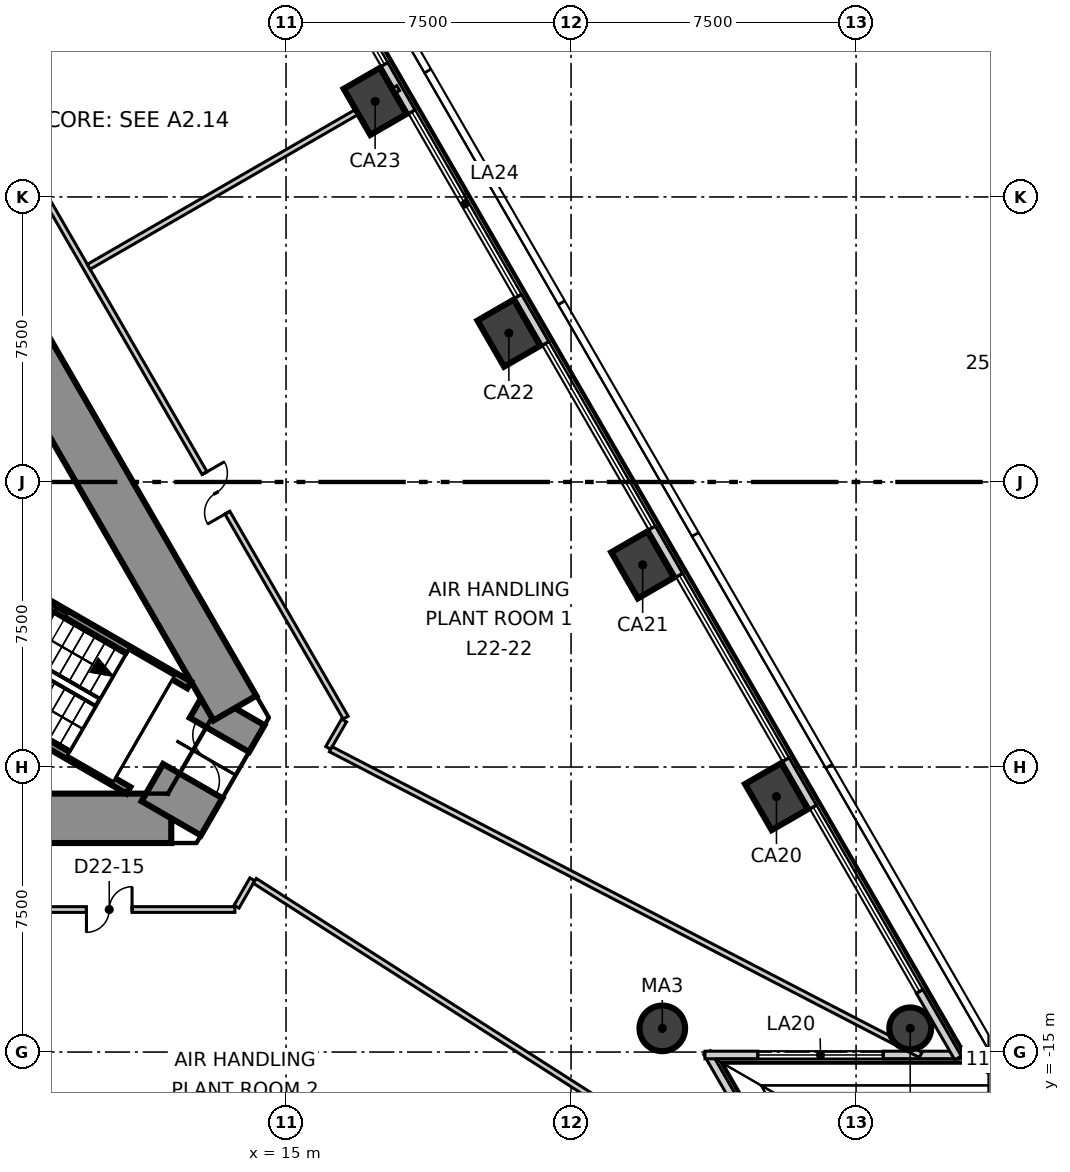
"""IFC4 building model, lengths in metres.
Left out: names, types, materials, properties, quantities, classifications, styles, units other than length and angle.
Written with IfcOpenShell. Run it as: python <this file> out.ifc"""

import sys

from ifc_helpers import new_model, si_unit, direction, frame, frame_2d, origin, origin_2d, place, context, subcontext, project, spatial, polyline, rectangle, circle, outline, extrude, element, fill, save


model = new_model("IFC4")
c1 = context("Model", 3, precision=1e-05, world=origin(), true_north=direction((0.0, 1.0)))
c2 = subcontext(c1, "Body", "Model", "MODEL_VIEW")
j1 = project(units=[si_unit("LENGTHUNIT", "METRE"), si_unit("PLANEANGLEUNIT", "RADIAN")], contexts=[c1])
p1 = place(None, origin())
s1 = spatial("IfcSite", under=j1, at=p1, CompositionType="ELEMENT")
p2 = place(p1, origin())
s2 = spatial("IfcBuilding", under=s1, at=p2, CompositionType="ELEMENT")
p3 = place(p2, frame((0.0, 0.0, 99.8)))
s3 = spatial("IfcBuildingStorey", under=s2, at=p3, CompositionType="ELEMENT", Elevation=99.8)
p4 = place(p3, frame((-11.98, -8.85, -0.6), z_axis=(0.0, 0.0, 1.0), x_axis=(1.0, 0.0, 0.0)))
e1 = element("IfcWall", 1, at=p4, inside=s3, PredefinedType="SHEAR", context=c2, shape_type="SweptSolid", body=[
    extrude(outline(polyline([(-0.664, -0.65), (1.281, -0.65), (3.226, -0.65), (5.172, -0.65), (7.117, -0.65), (9.062, -0.65), (11.007, -0.65), (12.953, -0.65), (14.898, -0.65), (16.843, -0.65), (18.788, -0.65), (20.734, -0.65), (22.679, -0.65), (24.624, -0.65), (23.296, 0.65), (21.41, 0.65), (19.524, 0.65), (17.638, 0.65), (15.752, 0.65), (13.866, 0.65), (11.98, 0.65), (10.094, 0.65), (8.208, 0.65), (6.322, 0.65), (4.436, 0.65), (2.55, 0.65), (0.664, 0.65), (-0.664, -0.65)])), origin(), (0.0, 0.0, 1.0), 4.8),
])
p5 = place(p3, frame((11.98, -8.85, -0.6), z_axis=(0.0, 0.0, 1.0), x_axis=(0.499926515799, 0.866067825751, 0.0)))
e2 = element("IfcWall", 2, at=p5, inside=s3, PredefinedType="SHEAR", context=c2, shape_type="SweptSolid", body=[
    extrude(outline(polyline([(-0.231, -0.9), (1.674, -0.9), (3.579, -0.9), (3.118, 0.9), (1.674, 0.9), (0.231, 0.9), (-0.231, -0.9)])), origin(), (0.0, 0.0, 1.0), 4.8),
])
p6 = place(p5, frame((1.133, 0.0, 0.6)))
e3 = element("IfcOpeningElement", 3, at=p6, cuts=e2, PredefinedType="OPENING", context=c2, shape_type="SweptSolid", body=[
    extrude(rectangle(XDim=1.4, YDim=2.1, at=frame_2d((0.7, 1.05))), frame((0.0, 0.91, 0.0), z_axis=(0.0, -1.0, 0.0), x_axis=(1.0, 0.0, 0.0)), (0.0, 0.0, 1.0), 1.82),
])
p7 = place(p3, frame((13.654, -5.95, -0.6), z_axis=(0.0, 0.0, 1.0), x_axis=(-0.499998822509, 0.866026083608, 0.0)))
e4 = element("IfcWall", 4, at=p7, inside=s3, PredefinedType="SHEAR", context=c2, shape_type="SweptSolid", body=[
    extrude(outline(polyline([(-0.664, -0.65), (1.281, -0.65), (3.226, -0.65), (5.172, -0.65), (7.117, -0.65), (9.062, -0.65), (11.007, -0.65), (12.953, -0.65), (14.898, -0.65), (16.843, -0.65), (18.788, -0.65), (20.734, -0.65), (22.679, -0.65), (24.624, -0.65), (23.296, 0.65), (21.41, 0.65), (19.524, 0.65), (17.638, 0.65), (15.752, 0.65), (13.866, 0.65), (11.98, 0.65), (10.094, 0.65), (8.208, 0.65), (6.322, 0.65), (4.436, 0.65), (2.55, 0.65), (0.664, 0.65), (-0.664, -0.65)])), origin(), (0.0, 0.0, 1.0), 4.8),
])
p8 = place(p7, frame((11.369, 0.0, 0.6)))
e5 = element("IfcOpeningElement", 5, at=p8, cuts=e4, PredefinedType="OPENING", context=c2, shape_type="SweptSolid", body=[
    extrude(rectangle(XDim=1.8, YDim=2.1, at=frame_2d((0.9, 1.05))), frame((0.0, 0.66, 0.0), z_axis=(0.0, -1.0, 0.0), x_axis=(1.0, 0.0, 0.0)), (0.0, 0.0, 1.0), 1.32),
])
p9 = place(p3, frame((31.425, -14.377, -0.6), z_axis=(0.0, 0.0, 1.0), x_axis=(-0.5, 0.866025403784, 0.0)))
e6 = element("IfcColumn", 6, at=p9, inside=s3, PredefinedType="COLUMN", context=c2, shape_type="SweptSolid", body=[
    extrude(circle(Radius=0.55, at=origin_2d()), origin(), (0.0, 0.0, 1.0), 4.8),
])
for number, where, z_axis, x_axis in (
    (7, (27.905, -8.279, -0.6), (0.0, 0.0, 1.0), (-0.5, 0.866, 0.0)),
    (8, (24.384, -2.182, -0.6), (0.0, 0.0, 1.0), (-0.5, 0.866, 0.0)),
    (9, (20.864, 3.916, -0.6), (0.0, 0.0, 1.0), (-0.5, 0.866, 0.0)),
    (10, (17.344, 10.014, -0.6), (0.0, 0.0, 1.0), (-0.5, 0.866, 0.0)),
):
    element("IfcColumn", number, at=place(p3, frame(where, z_axis=z_axis, x_axis=x_axis)), inside=s3, PredefinedType="COLUMN", context=c2, shape_type="SweptSolid", body=[
        extrude(rectangle(XDim=1.4, YDim=1.1, at=origin_2d()), origin(), (0.0, 0.0, 1.0), 4.8),
    ])
p10 = place(p3, frame((24.901, -14.377, -0.6), z_axis=(0.0, 0.0, 1.0), x_axis=(1.0, 0.0, 0.0)))
e11 = element("IfcColumn", 11, at=p10, inside=s3, PredefinedType="COLUMN", context=c2, shape_type="SweptSolid", body=[
    extrude(circle(Radius=0.6, at=origin_2d()), origin(), (0.0, 0.0, 1.0), 4.8),
])
p11 = place(p3, frame((29.421, -20.805, 0.0), z_axis=(0.0, 0.0, 1.0), x_axis=(-0.499957477642, 0.866049952687, 0.0)))
e12 = element("IfcWall", 12, at=p11, inside=s3, PredefinedType="ELEMENTEDWALL", context=c2, shape_type="SweptSolid", body=[
    extrude(rectangle(XDim=6.684, YDim=0.2, at=frame_2d((3.342, 0.0))), origin(), (0.0, 0.0, 1.0), 4.2),
])
p12 = place(p11, frame((1.99, 0.0, 0.6)))
e13 = element("IfcOpeningElement", 13, at=p12, cuts=e12, PredefinedType="OPENING", context=c2, shape_type="SweptSolid", body=[
    extrude(rectangle(XDim=3.3, YDim=3.0, at=frame_2d((1.65, 1.5))), frame((0.0, 0.11, 0.0), z_axis=(0.0, -1.0, 0.0), x_axis=(1.0, 0.0, 0.0)), (0.0, 0.0, 1.0), 0.22),
])
p13 = place(p3, frame((26.024, -15.077, 0.0), z_axis=(0.0, 0.0, 1.0), x_axis=(1.0, 0.0, 0.0)))
e14 = element("IfcWall", 14, at=p13, inside=s3, PredefinedType="ELEMENTEDWALL", context=c2, shape_type="SweptSolid", body=[
    extrude(rectangle(XDim=6.684, YDim=0.2, at=frame_2d((3.342, 0.0))), origin(), (0.0, 0.0, 1.0), 4.2),
])
p14 = place(p13, frame((1.39, 0.0, 0.6)))
e15 = element("IfcOpeningElement", 15, at=p14, cuts=e14, PredefinedType="OPENING", context=c2, shape_type="SweptSolid", body=[
    extrude(rectangle(XDim=3.3, YDim=3.0, at=frame_2d((1.65, 1.5))), frame((0.0, 0.11, 0.0), z_axis=(0.0, -1.0, 0.0), x_axis=(1.0, 0.0, 0.0)), (0.0, 0.0, 1.0), 0.22),
])
p15 = place(p3, frame((32.683, -15.155, 0.0), z_axis=(0.0, 0.0, 1.0), x_axis=(-0.499995323711, 0.866028103624, 0.0)))
e16 = element("IfcWall", 16, at=p15, inside=s3, PredefinedType="ELEMENTEDWALL", context=c2, shape_type="SweptSolid", body=[
    extrude(rectangle(XDim=58.913, YDim=0.2, at=frame_2d((29.456, 0.0))), origin(), (0.0, 0.0, 1.0), 4.2),
])
p16 = place(p15, frame((2.023, 0.0, 0.6)))
e17 = element("IfcOpeningElement", 17, at=p16, cuts=e16, PredefinedType="OPENING", context=c2, shape_type="SweptSolid", body=[
    extrude(rectangle(XDim=5.6, YDim=3.0, at=frame_2d((2.8, 1.5))), frame((0.0, 0.11, 0.0), z_axis=(0.0, -1.0, 0.0), x_axis=(1.0, 0.0, 0.0)), (0.0, 0.0, 1.0), 0.22),
])
p17 = place(p15, frame((9.064, 0.0, 0.6)))
e18 = element("IfcOpeningElement", 18, at=p17, cuts=e16, PredefinedType="OPENING", context=c2, shape_type="SweptSolid", body=[
    extrude(rectangle(XDim=5.6, YDim=3.0, at=frame_2d((2.8, 1.5))), frame((0.0, 0.11, 0.0), z_axis=(0.0, -1.0, 0.0), x_axis=(1.0, 0.0, 0.0)), (0.0, 0.0, 1.0), 0.22),
])
p18 = place(p15, frame((16.105, 0.0, 0.6)))
e19 = element("IfcOpeningElement", 19, at=p18, cuts=e16, PredefinedType="OPENING", context=c2, shape_type="SweptSolid", body=[
    extrude(rectangle(XDim=5.6, YDim=3.0, at=frame_2d((2.8, 1.5))), frame((0.0, 0.11, 0.0), z_axis=(0.0, -1.0, 0.0), x_axis=(1.0, 0.0, 0.0)), (0.0, 0.0, 1.0), 0.22),
])
p19 = place(p15, frame((23.146, 0.0, 0.6)))
e20 = element("IfcOpeningElement", 20, at=p19, cuts=e16, PredefinedType="OPENING", context=c2, shape_type="SweptSolid", body=[
    extrude(rectangle(XDim=5.6, YDim=3.0, at=frame_2d((2.8, 1.5))), frame((0.0, 0.11, 0.0), z_axis=(0.0, -1.0, 0.0), x_axis=(1.0, 0.0, 0.0)), (0.0, 0.0, 1.0), 0.22),
])
p20 = place(p15, frame((30.187, 0.0, 0.6)))
e21 = element("IfcOpeningElement", 21, at=p20, cuts=e16, PredefinedType="OPENING", context=c2, shape_type="SweptSolid", body=[
    extrude(rectangle(XDim=5.6, YDim=3.0, at=frame_2d((2.8, 1.5))), frame((0.0, 0.11, 0.0), z_axis=(0.0, -1.0, 0.0), x_axis=(1.0, 0.0, 0.0)), (0.0, 0.0, 1.0), 0.22),
])
p21 = place(p15, frame((37.228, 0.0, 0.6)))
e22 = element("IfcOpeningElement", 22, at=p21, cuts=e16, PredefinedType="OPENING", context=c2, shape_type="SweptSolid", body=[
    extrude(rectangle(XDim=5.6, YDim=3.0, at=frame_2d((2.8, 1.5))), frame((0.0, 0.11, 0.0), z_axis=(0.0, -1.0, 0.0), x_axis=(1.0, 0.0, 0.0)), (0.0, 0.0, 1.0), 0.22),
])
p22 = place(p15, frame((44.268, 0.0, 0.6)))
e23 = element("IfcOpeningElement", 23, at=p22, cuts=e16, PredefinedType="OPENING", context=c2, shape_type="SweptSolid", body=[
    extrude(rectangle(XDim=5.6, YDim=3.0, at=frame_2d((2.8, 1.5))), frame((0.0, 0.11, 0.0), z_axis=(0.0, -1.0, 0.0), x_axis=(1.0, 0.0, 0.0)), (0.0, 0.0, 1.0), 0.22),
])
p23 = place(p15, frame((51.309, 0.0, 0.6)))
e24 = element("IfcOpeningElement", 24, at=p23, cuts=e16, PredefinedType="OPENING", context=c2, shape_type="SweptSolid", body=[
    extrude(rectangle(XDim=5.6, YDim=3.0, at=frame_2d((2.8, 1.5))), frame((0.0, 0.11, 0.0), z_axis=(0.0, -1.0, 0.0), x_axis=(1.0, 0.0, 0.0)), (0.0, 0.0, 1.0), 0.22),
])
p24 = place(p3, frame((-13.568, -11.25, 0.0), z_axis=(0.0, 0.0, 1.0), x_axis=(1.0, 0.0, 0.0)))
e25 = element("IfcWall", 25, at=p24, inside=s3, PredefinedType="PARTITIONING", context=c2, shape_type="SweptSolid", body=[
    extrude(rectangle(XDim=27.222, YDim=0.15, at=frame_2d((13.611, 0.0))), origin(), (0.0, 0.0, 1.0), 4.2),
])
p25 = place(p24, frame((2.62, 0.0, 0.0)))
e26 = element("IfcOpeningElement", 26, at=p25, cuts=e25, PredefinedType="OPENING", context=c2, shape_type="SweptSolid", body=[
    extrude(rectangle(XDim=1.2, YDim=2.1, at=frame_2d((0.6, 1.05))), frame((0.0, 0.085, 0.0), z_axis=(0.0, -1.0, 0.0), x_axis=(1.0, 0.0, 0.0)), (0.0, 0.0, 1.0), 0.17),
])
p26 = place(p24, frame((12.968, 0.0, 0.0)))
e27 = element("IfcOpeningElement", 27, at=p26, cuts=e25, PredefinedType="OPENING", context=c2, shape_type="SweptSolid", body=[
    extrude(rectangle(XDim=1.2, YDim=2.1, at=frame_2d((0.6, 1.05))), frame((0.0, 0.085, 0.0), z_axis=(0.0, -1.0, 0.0), x_axis=(1.0, 0.0, 0.0)), (0.0, 0.0, 1.0), 0.17),
])
p27 = place(p24, frame((23.316, 0.0, 0.0)))
e28 = element("IfcOpeningElement", 28, at=p27, cuts=e25, PredefinedType="OPENING", context=c2, shape_type="SweptSolid", body=[
    extrude(rectangle(XDim=1.2, YDim=2.1, at=frame_2d((0.6, 1.05))), frame((0.0, 0.085, 0.0), z_axis=(0.0, -1.0, 0.0), x_axis=(1.0, 0.0, 0.0)), (0.0, 0.0, 1.0), 0.17),
])
p28 = place(p3, frame((2.959, 17.375, 0.0), z_axis=(0.0, 0.0, 1.0), x_axis=(0.500002192499, -0.866024137941, 0.0)))
e29 = element("IfcWall", 29, at=p28, inside=s3, PredefinedType="PARTITIONING", context=c2, shape_type="SweptSolid", body=[
    extrude(rectangle(XDim=27.222, YDim=0.15, at=frame_2d((13.611, 0.0))), origin(), (0.0, 0.0, 1.0), 4.2),
])
p29 = place(p28, frame((19.795, 0.0, 0.0)))
e30 = element("IfcOpeningElement", 30, at=p29, cuts=e29, PredefinedType="OPENING", context=c2, shape_type="SweptSolid", body=[
    extrude(rectangle(XDim=1.2, YDim=2.1, at=frame_2d((0.6, 1.05))), frame((0.0, 0.085, 0.0), z_axis=(0.0, -1.0, 0.0), x_axis=(1.0, 0.0, 0.0)), (0.0, 0.0, 1.0), 0.17),
])
p30 = place(p28, frame((6.141, 0.0, 0.0)))
e31 = element("IfcOpeningElement", 31, at=p30, cuts=e29, PredefinedType="OPENING", context=c2, shape_type="SweptSolid", body=[
    extrude(rectangle(XDim=1.2, YDim=2.1, at=frame_2d((0.6, 1.05))), frame((0.0, 0.085, 0.0), z_axis=(0.0, -1.0, 0.0), x_axis=(1.0, 0.0, 0.0)), (0.0, 0.0, 1.0), 0.17),
])
p31 = place(p3, frame((13.698, -11.175, 0.0), z_axis=(0.0, 0.0, 1.0), x_axis=(0.499425709803, 0.866356716594, 0.0)))
e32 = element("IfcWall", 32, at=p31, inside=s3, PredefinedType="PARTITIONING", context=c2, shape_type="SweptSolid", body=[
    extrude(rectangle(XDim=0.831, YDim=0.15, at=frame_2d((0.416, 0.0))), origin(), (0.0, 0.0, 1.0), 4.2),
])
p32 = place(p3, frame((16.109, -6.998, 0.0), z_axis=(0.0, 0.0, 1.0), x_axis=(0.500633001124, 0.865659631833, 0.0)))
e33 = element("IfcWall", 33, at=p32, inside=s3, PredefinedType="PARTITIONING", context=c2, shape_type="SweptSolid", body=[
    extrude(rectangle(XDim=0.835, YDim=0.15, at=frame_2d((0.418, 0.0))), origin(), (0.0, 0.0, 1.0), 4.2),
])
p33 = place(p3, frame((14.177, -10.495, 0.0), z_axis=(0.0, 0.0, 1.0), x_axis=(0.842276215782, -0.539046172724, 0.0)))
e34 = element("IfcWall", 34, at=p33, inside=s3, PredefinedType="PARTITIONING", context=c2, shape_type="SweptSolid", body=[
    extrude(rectangle(XDim=17.496, YDim=0.15, at=frame_2d((8.748, 0.0))), origin(), (0.0, 0.0, 1.0), 3.4),
])
p34 = place(p3, frame((9.808, 5.662, 0.0), z_axis=(0.0, 0.0, 1.0), x_axis=(0.866014767649, 0.500018421874, 0.0)))
e35 = element("IfcWall", 35, at=p34, inside=s3, PredefinedType="PARTITIONING", context=c2, shape_type="SweptSolid", body=[
    extrude(rectangle(XDim=9.402, YDim=0.15, at=frame_2d((4.701, 0.0))), origin(), (0.0, 0.0, 1.0), 3.7),
])
p35 = place(p3, frame((16.176, -7.032, 0.0), z_axis=(0.0, 0.0, 1.0), x_axis=(0.887871998407, -0.460090550267, 0.0)))
e36 = element("IfcWall", 36, at=p35, inside=s3, PredefinedType="PARTITIONING", context=c2, shape_type="SweptSolid", body=[
    extrude(rectangle(XDim=17.486, YDim=0.15, at=frame_2d((8.743, 0.0))), origin(), (0.0, 0.0, 1.0), 3.4),
])
p36 = place(p3, frame((4.929, -4.693, 0.0), z_axis=(0.0, 0.0, 1.0), x_axis=(0.866047105788, -0.499962409144, 0.0)))
e37 = element("IfcWall", 37, at=p36, inside=s3, PredefinedType="SOLIDWALL", context=c2, shape_type="SweptSolid", body=[
    extrude(rectangle(XDim=6.84, YDim=0.2, at=frame_2d((3.42, 0.0))), origin(), (0.0, 0.0, 1.0), 4.2),
])
p37 = place(p3, frame((6.529, -1.922, 0.0), z_axis=(0.0, 0.0, 1.0), x_axis=(0.866002488145, -0.500039688951, 0.0)))
e38 = element("IfcWall", 38, at=p37, inside=s3, PredefinedType="SOLIDWALL", context=c2, shape_type="SweptSolid", body=[
    extrude(rectangle(XDim=6.839, YDim=0.2, at=frame_2d((3.42, 0.0))), origin(), (0.0, 0.0, 1.0), 4.2),
])
p38 = place(p14, origin())
e39 = element("IfcWindow", 39, at=p38, inside=s3, PartitioningType="SINGLE_PANEL", PredefinedType="WINDOW", context=c2, shape_type="SweptSolid", body=[
    extrude(rectangle(XDim=3.3, YDim=3.0, at=frame_2d((1.65, 1.5))), frame((0.0, 0.03, 0.0), z_axis=(0.0, -1.0, 0.0), x_axis=(1.0, 0.0, 0.0)), (0.0, 0.0, 1.0), 0.06),
])
fill(e15, e39)
p39 = place(p16, origin())
e40 = element("IfcWindow", 40, at=p39, inside=s3, PartitioningType="SINGLE_PANEL", PredefinedType="WINDOW", context=c2, shape_type="SweptSolid", body=[
    extrude(rectangle(XDim=5.6, YDim=3.0, at=frame_2d((2.8, 1.5))), frame((0.0, 0.03, 0.0), z_axis=(0.0, -1.0, 0.0), x_axis=(1.0, 0.0, 0.0)), (0.0, 0.0, 1.0), 0.06),
])
fill(e17, e40)
p40 = place(p17, origin())
e41 = element("IfcWindow", 41, at=p40, inside=s3, PartitioningType="SINGLE_PANEL", PredefinedType="WINDOW", context=c2, shape_type="SweptSolid", body=[
    extrude(rectangle(XDim=5.6, YDim=3.0, at=frame_2d((2.8, 1.5))), frame((0.0, 0.03, 0.0), z_axis=(0.0, -1.0, 0.0), x_axis=(1.0, 0.0, 0.0)), (0.0, 0.0, 1.0), 0.06),
])
fill(e18, e41)
p41 = place(p18, origin())
e42 = element("IfcWindow", 42, at=p41, inside=s3, PartitioningType="SINGLE_PANEL", PredefinedType="WINDOW", context=c2, shape_type="SweptSolid", body=[
    extrude(rectangle(XDim=5.6, YDim=3.0, at=frame_2d((2.8, 1.5))), frame((0.0, 0.03, 0.0), z_axis=(0.0, -1.0, 0.0), x_axis=(1.0, 0.0, 0.0)), (0.0, 0.0, 1.0), 0.06),
])
fill(e19, e42)
p42 = place(p19, origin())
e43 = element("IfcWindow", 43, at=p42, inside=s3, PartitioningType="SINGLE_PANEL", PredefinedType="WINDOW", context=c2, shape_type="SweptSolid", body=[
    extrude(rectangle(XDim=5.6, YDim=3.0, at=frame_2d((2.8, 1.5))), frame((0.0, 0.03, 0.0), z_axis=(0.0, -1.0, 0.0), x_axis=(1.0, 0.0, 0.0)), (0.0, 0.0, 1.0), 0.06),
])
fill(e20, e43)
p43 = place(p20, origin())
e44 = element("IfcWindow", 44, at=p43, inside=s3, PartitioningType="SINGLE_PANEL", PredefinedType="WINDOW", context=c2, shape_type="SweptSolid", body=[
    extrude(rectangle(XDim=5.6, YDim=3.0, at=frame_2d((2.8, 1.5))), frame((0.0, 0.03, 0.0), z_axis=(0.0, -1.0, 0.0), x_axis=(1.0, 0.0, 0.0)), (0.0, 0.0, 1.0), 0.06),
])
fill(e21, e44)
p44 = place(p29, origin())
e45 = element("IfcDoor", 45, at=p44, inside=s3, OperationType="DOUBLE_DOOR_SINGLE_SWING", PredefinedType="DOOR", context=c2, shape_type="SweptSolid", body=[
    extrude(rectangle(XDim=1.2, YDim=2.1, at=frame_2d((0.6, 1.05))), frame((0.0, 0.025, 0.0), z_axis=(0.0, -1.0, 0.0), x_axis=(1.0, 0.0, 0.0)), (0.0, 0.0, 1.0), 0.05),
])
fill(e30, e45)
p45 = place(p27, origin())
e46 = element("IfcDoor", 46, at=p45, inside=s3, OperationType="DOUBLE_DOOR_SINGLE_SWING", PredefinedType="DOOR", context=c2, shape_type="SweptSolid", body=[
    extrude(rectangle(XDim=1.2, YDim=2.1, at=frame_2d((0.6, 1.05))), frame((0.0, 0.025, 0.0), z_axis=(0.0, -1.0, 0.0), x_axis=(1.0, 0.0, 0.0)), (0.0, 0.0, 1.0), 0.05),
])
fill(e28, e46)
p46 = place(p6, origin())
e47 = element("IfcDoor", 47, at=p46, inside=s3, OperationType="DOUBLE_DOOR_SINGLE_SWING", PredefinedType="DOOR", context=c2, shape_type="SweptSolid", body=[
    extrude(rectangle(XDim=1.4, YDim=2.1, at=frame_2d((0.7, 1.05))), frame((0.0, 0.025, 0.0), z_axis=(0.0, -1.0, 0.0), x_axis=(1.0, 0.0, 0.0)), (0.0, 0.0, 1.0), 0.05),
])
fill(e3, e47)
save(model, sys.argv[1])
